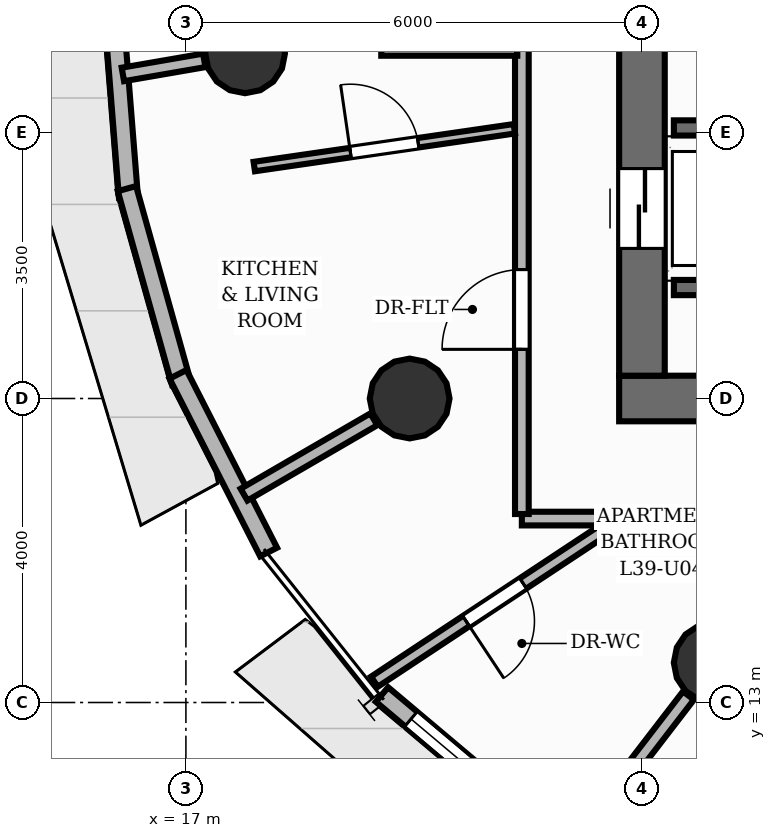
"""IFC4 building model, lengths in metres.
Left out: names, types, materials, properties, quantities, classifications, styles, units other than length and angle.
Written with IfcOpenShell. Run it as: python <this file> out.ifc"""

import sys

from ifc_helpers import new_model, si_unit, direction, frame, frame_2d, origin, origin_2d, place, context, subcontext, project, spatial, rectangle, circle, extrude, element, fill, save


model = new_model("IFC4")
c1 = context("Model", 3, precision=1e-05, world=origin(), true_north=direction((0.0, 1.0)))
c2 = subcontext(c1, "Body", "Model", "MODEL_VIEW")
j1 = project(units=[si_unit("LENGTHUNIT", "METRE"), si_unit("PLANEANGLEUNIT", "RADIAN")], contexts=[c1])
p1 = place(None, origin())
s1 = spatial("IfcSite", under=j1, at=p1, CompositionType="ELEMENT")
p2 = place(p1, origin())
s2 = spatial("IfcBuilding", under=s1, at=p2, CompositionType="ELEMENT")
p3 = place(p2, frame((0.0, 0.0, 132.96)))
s3 = spatial("IfcBuildingStorey", under=s2, at=p3, CompositionType="ELEMENT", Elevation=132.96)
p4 = place(p3, frame((22.7, 17.0, 0.0), z_axis=(0.0, 0.0, 1.0), x_axis=(1.0, 0.0, 0.0)))
e1 = element("IfcWall", 1, at=p4, inside=s3, PredefinedType="SHEAR", context=c2, shape_type="SweptSolid", body=[
    extrude(rectangle(XDim=15.1, YDim=0.6, at=frame_2d((7.55, 0.0))), origin(), (0.0, 0.0, 1.0), 3.2),
])
p5 = place(p4, frame((5.8, 0.0, 0.0)))
e2 = element("IfcOpeningElement", 2, at=p5, cuts=e1, PredefinedType="OPENING", context=c2, shape_type="SweptSolid", body=[
    extrude(rectangle(XDim=1.1, YDim=2.15, at=frame_2d((0.55, 1.075))), frame((0.0, 0.31, 0.0), z_axis=(0.0, -1.0, 0.0), x_axis=(1.0, 0.0, 0.0)), (0.0, 0.0, 1.0), 0.62),
])
p6 = place(p4, frame((9.35, 0.0, 0.0)))
e3 = element("IfcOpeningElement", 3, at=p6, cuts=e1, PredefinedType="OPENING", context=c2, shape_type="SweptSolid", body=[
    extrude(rectangle(XDim=0.9, YDim=2.1, at=frame_2d((0.45, 1.05))), frame((0.0, 0.31, 0.0), z_axis=(0.0, -1.0, 0.0), x_axis=(1.0, 0.0, 0.0)), (0.0, 0.0, 1.0), 0.62),
])
p7 = place(p3, frame((23.0, 17.3, 0.0), z_axis=(0.0, 0.0, 1.0), x_axis=(0.0, 1.0, 0.0)))
e4 = element("IfcWall", 4, at=p7, inside=s3, PredefinedType="SHEAR", context=c2, shape_type="SweptSolid", body=[
    extrude(rectangle(XDim=13.4, YDim=0.6, at=frame_2d((6.7, 0.0))), origin(), (0.0, 0.0, 1.0), 3.2),
])
p8 = place(p7, frame((1.675, 0.0, 0.0)))
e5 = element("IfcOpeningElement", 5, at=p8, cuts=e4, PredefinedType="OPENING", context=c2, shape_type="SweptSolid", body=[
    extrude(rectangle(XDim=1.05, YDim=2.15, at=frame_2d((0.525, 1.075))), frame((0.0, 0.31, 0.0), z_axis=(0.0, -1.0, 0.0), x_axis=(1.0, 0.0, 0.0)), (0.0, 0.0, 1.0), 0.62),
])
p9 = place(p7, frame((6.175, 0.0, 0.0)))
e6 = element("IfcOpeningElement", 6, at=p9, cuts=e4, PredefinedType="OPENING", context=c2, shape_type="SweptSolid", body=[
    extrude(rectangle(XDim=1.05, YDim=2.15, at=frame_2d((0.525, 1.075))), frame((0.0, 0.31, 0.0), z_axis=(0.0, -1.0, 0.0), x_axis=(1.0, 0.0, 0.0)), (0.0, 0.0, 1.0), 0.62),
])
p10 = place(p7, frame((10.675, 0.0, 0.0)))
e7 = element("IfcOpeningElement", 7, at=p10, cuts=e4, PredefinedType="OPENING", context=c2, shape_type="SweptSolid", body=[
    extrude(rectangle(XDim=1.05, YDim=2.15, at=frame_2d((0.525, 1.075))), frame((0.0, 0.31, 0.0), z_axis=(0.0, -1.0, 0.0), x_axis=(1.0, 0.0, 0.0)), (0.0, 0.0, 1.0), 0.62),
])
for number, where, z_axis, x_axis in (
    (8, (17.779, 21.542, 0.0), (0.0, 0.0, 1.0), (1.0, 0.0, 0.0)),
    (9, (19.944, 17.0, 0.0), (0.0, 0.0, 1.0), (1.0, 0.0, 0.0)),
    (10, (23.944, 13.523, 0.0), (0.0, 0.0, 1.0), (1.0, 0.0, 0.0)),
):
    element("IfcColumn", number, at=place(p3, frame(where, z_axis=z_axis, x_axis=x_axis)), inside=s3, PredefinedType="COLUMN", context=c2, shape_type="SweptSolid", body=[
        extrude(circle(Radius=0.525, at=origin_2d()), origin(), (0.0, 0.0, 1.0), 3.2),
    ])
p11 = place(p3, frame((16.244, 19.65, 0.0), z_axis=(0.0, 0.0, 1.0), x_axis=(-0.079420906371, 0.996841170714, 0.0)))
e11 = element("IfcWall", 11, at=p11, inside=s3, PredefinedType="SOLIDWALL", context=c2, shape_type="SweptSolid", body=[
    extrude(rectangle(XDim=2.693, YDim=0.25, at=frame_2d((1.346, 0.0))), origin(), (0.0, 0.0, 1.0), 2.96),
])
p12 = place(p3, frame((16.938, 17.211, 0.0), z_axis=(0.0, 0.0, 1.0), x_axis=(-0.269469206067, 0.963009006698, 0.0)))
e12 = element("IfcWall", 12, at=p12, inside=s3, PredefinedType="SOLIDWALL", context=c2, shape_type="SweptSolid", body=[
    extrude(rectangle(XDim=2.648, YDim=0.25, at=frame_2d((1.324, 0.0))), origin(), (0.0, 0.0, 1.0), 2.96),
])
p13 = place(p3, frame((18.088, 14.98, 0.0), z_axis=(0.0, 0.0, 1.0), x_axis=(-0.454196134835, 0.890901717981, 0.0)))
e13 = element("IfcWall", 13, at=p13, inside=s3, PredefinedType="SOLIDWALL", context=c2, shape_type="SweptSolid", body=[
    extrude(rectangle(XDim=2.624, YDim=0.25, at=frame_2d((1.312, 0.0))), origin(), (0.0, 0.0, 1.0), 2.96),
])
p14 = place(p3, frame((21.605, 11.399, 0.0), z_axis=(0.0, 0.0, 1.0), x_axis=(-0.764825125467, 0.644237943197, 0.0)))
e14 = element("IfcWall", 14, at=p14, inside=s3, PredefinedType="SOLIDWALL", context=c2, shape_type="SweptSolid", body=[
    extrude(rectangle(XDim=2.648, YDim=0.25, at=frame_2d((1.324, 0.0))), origin(), (0.0, 0.0, 1.0), 2.96),
])
p15 = place(p14, frame((0.499, 0.0, 0.85)))
e15 = element("IfcOpeningElement", 15, at=p15, cuts=e14, PredefinedType="OPENING", context=c2, shape_type="SweptSolid", body=[
    extrude(rectangle(XDim=1.65, YDim=1.55, at=frame_2d((0.825, 0.775))), frame((0.0, 0.135, 0.0), z_axis=(0.0, -1.0, 0.0), x_axis=(1.0, 0.0, 0.0)), (0.0, 0.0, 1.0), 0.27),
])
for number, where, z_axis, x_axis in (
    (16, (23.42, 18.46, 0.0), (0.0, 0.0, 1.0), (1.0, 0.0, 0.0)),
    (17, (23.42, 20.56, 0.0), (0.0, 0.0, 1.0), (1.0, 0.0, 0.0)),
):
    element("IfcWall", number, at=place(p3, frame(where, z_axis=z_axis, x_axis=x_axis)), inside=s3, PredefinedType="SHEAR", context=c2, shape_type="SweptSolid", body=[
        extrude(rectangle(XDim=1.71, YDim=0.2, at=frame_2d((0.855, 0.0))), origin(), (0.0, 0.0, 1.0), 3.2),
    ])
p16 = place(p3, frame((17.242, 21.449, 0.0), z_axis=(0.0, 0.0, 1.0), x_axis=(-0.985361391556, -0.170478526599, 0.0)))
e18 = element("IfcWall", 18, at=p16, inside=s3, PredefinedType="PARTITIONING", context=c2, shape_type="SweptSolid", body=[
    extrude(rectangle(XDim=1.087, YDim=0.18, at=frame_2d((0.543, 0.0))), origin(), (0.0, 0.0, 1.0), 2.336),
])
p17 = place(p3, frame((19.472, 16.726, 0.0), z_axis=(0.0, 0.0, 1.0), x_axis=(-0.864844369658, -0.502040054448, 0.0)))
e19 = element("IfcWall", 19, at=p17, inside=s3, PredefinedType="PARTITIONING", context=c2, shape_type="SweptSolid", body=[
    extrude(rectangle(XDim=1.974, YDim=0.18, at=frame_2d((0.987, 0.0))), origin(), (0.0, 0.0, 1.0), 2.336),
])
p18 = place(p3, frame((23.612, 13.092, 0.0), z_axis=(0.0, 0.0, 1.0), x_axis=(-0.609549509747, -0.79274800231, 0.0)))
e20 = element("IfcWall", 20, at=p18, inside=s3, PredefinedType="PARTITIONING", context=c2, shape_type="SweptSolid", body=[
    extrude(rectangle(XDim=2.415, YDim=0.18, at=frame_2d((1.208, 0.0))), origin(), (0.0, 0.0, 1.0), 2.336),
])
p19 = place(p3, frame((39.08, 15.42, 0.0), z_axis=(0.0, 0.0, 1.0), x_axis=(-1.0, 0.0, 0.0)))
e21 = element("IfcWall", 21, at=p19, inside=s3, PredefinedType="PARTITIONING", context=c2, shape_type="SweptSolid", body=[
    extrude(rectangle(XDim=16.39, YDim=0.18, at=frame_2d((8.195, 0.0))), origin(), (0.0, 0.0, 1.0), 2.955),
])
p20 = place(p19, frame((4.593, 0.0, 0.0)))
e22 = element("IfcOpeningElement", 22, at=p20, cuts=e21, PredefinedType="OPENING", context=c2, shape_type="SweptSolid", body=[
    extrude(rectangle(XDim=1.05, YDim=2.15, at=frame_2d((0.525, 1.075))), frame((0.0, 0.1, 0.0), z_axis=(0.0, -1.0, 0.0), x_axis=(1.0, 0.0, 0.0)), (0.0, 0.0, 1.0), 0.2),
])
p21 = place(p3, frame((22.746, 15.42, 0.0), z_axis=(0.0, 0.0, 1.0), x_axis=(-1.0, 0.0, 0.0)))
e23 = element("IfcWall", 23, at=p21, inside=s3, PredefinedType="PARTITIONING", context=c2, shape_type="SweptSolid", body=[
    extrude(rectangle(XDim=1.326, YDim=0.18, at=frame_2d((0.663, 0.0))), origin(), (0.0, 0.0, 1.0), 2.955),
])
p22 = place(p3, frame((21.42, 15.48, 0.0), z_axis=(0.0, 0.0, 1.0), x_axis=(0.0, 1.0, 0.0)))
e24 = element("IfcWall", 24, at=p22, inside=s3, PredefinedType="PARTITIONING", context=c2, shape_type="SweptSolid", body=[
    extrude(rectangle(XDim=6.12, YDim=0.18, at=frame_2d((3.06, 0.0))), origin(), (0.0, 0.0, 1.0), 2.955),
])
p23 = place(p22, frame((2.167, 0.0, 0.0)))
e25 = element("IfcOpeningElement", 25, at=p23, cuts=e24, PredefinedType="OPENING", context=c2, shape_type="SweptSolid", body=[
    extrude(rectangle(XDim=1.05, YDim=2.15, at=frame_2d((0.525, 1.075))), frame((0.0, 0.1, 0.0), z_axis=(0.0, -1.0, 0.0), x_axis=(1.0, 0.0, 0.0)), (0.0, 0.0, 1.0), 0.2),
])
p24 = place(p3, frame((21.36, 21.6, 0.0), z_axis=(0.0, 0.0, 1.0), x_axis=(-1.0, 0.0, 0.0)))
e26 = element("IfcWall", 26, at=p24, inside=s3, PredefinedType="PARTITIONING", context=c2, shape_type="SweptSolid", body=[
    extrude(rectangle(XDim=1.79, YDim=0.18, at=frame_2d((0.895, 0.0))), origin(), (0.0, 0.0, 1.0), 2.336),
])
p25 = place(p3, frame((22.643, 15.365, 0.0), z_axis=(0.0, 0.0, 1.0), x_axis=(-0.83413433024, -0.551561346647, 0.0)))
e27 = element("IfcWall", 27, at=p25, inside=s3, PredefinedType="PLUMBINGWALL", context=c2, shape_type="SweptSolid", body=[
    extrude(rectangle(XDim=3.792, YDim=0.16, at=frame_2d((1.896, 0.0))), origin(), (0.0, 0.0, 1.0), 2.955),
])
p26 = place(p25, frame((1.446, 0.0, 0.0)))
e28 = element("IfcOpeningElement", 28, at=p26, cuts=e27, PredefinedType="OPENING", context=c2, shape_type="SweptSolid", body=[
    extrude(rectangle(XDim=0.9, YDim=2.1, at=frame_2d((0.45, 1.05))), frame((0.0, 0.09, 0.0), z_axis=(0.0, -1.0, 0.0), x_axis=(1.0, 0.0, 0.0)), (0.0, 0.0, 1.0), 0.18),
])
p27 = place(p3, frame((17.899, 20.052, 0.0), z_axis=(0.0, 0.0, 1.0), x_axis=(0.989601977359, 0.143832980941, 0.0)))
e29 = element("IfcWall", 29, at=p27, inside=s3, PredefinedType="PARTITIONING", context=c2, shape_type="SweptSolid", body=[
    extrude(rectangle(XDim=3.458, YDim=0.125, at=frame_2d((1.729, 0.0))), origin(), (0.0, 0.0, 1.0), 2.692),
])
p28 = place(p27, frame((1.279, 0.0, 0.0)))
e30 = element("IfcOpeningElement", 30, at=p28, cuts=e29, PredefinedType="OPENING", context=c2, shape_type="SweptSolid", body=[
    extrude(rectangle(XDim=0.9, YDim=2.1, at=frame_2d((0.45, 1.05))), frame((0.0, 0.073, 0.0), z_axis=(0.0, -1.0, 0.0), x_axis=(1.0, 0.0, 0.0)), (0.0, 0.0, 1.0), 0.145),
])
p29 = place(p15, origin())
e31 = element("IfcWindow", 31, at=p29, inside=s3, PartitioningType="SINGLE_PANEL", PredefinedType="WINDOW", context=c2, shape_type="SweptSolid", body=[
    extrude(rectangle(XDim=1.65, YDim=1.55, at=frame_2d((0.825, 0.775))), frame((0.0, 0.03, 0.0), z_axis=(0.0, -1.0, 0.0), x_axis=(1.0, 0.0, 0.0)), (0.0, 0.0, 1.0), 0.06),
])
fill(e15, e31)
p30 = place(p8, origin())
e32 = element("IfcDoor", 32, at=p30, inside=s3, OperationType="DOUBLE_DOOR_SLIDING", PredefinedType="DOOR", context=c2, shape_type="SweptSolid", body=[
    extrude(rectangle(XDim=1.05, YDim=2.15, at=frame_2d((0.525, 1.075))), frame((0.0, 0.025, 0.0), z_axis=(0.0, -1.0, 0.0), x_axis=(1.0, 0.0, 0.0)), (0.0, 0.0, 1.0), 0.05),
])
fill(e5, e32)
p31 = place(p23, origin())
e33 = element("IfcDoor", 33, at=p31, inside=s3, OperationType="SINGLE_SWING_LEFT", PredefinedType="DOOR", context=c2, shape_type="SweptSolid", body=[
    extrude(rectangle(XDim=1.05, YDim=2.15, at=frame_2d((0.525, 1.075))), frame((0.0, 0.025, 0.0), z_axis=(0.0, -1.0, 0.0), x_axis=(1.0, 0.0, 0.0)), (0.0, 0.0, 1.0), 0.05),
])
fill(e25, e33)
p32 = place(p26, origin())
e34 = element("IfcDoor", 34, at=p32, inside=s3, OperationType="SINGLE_SWING_RIGHT", PredefinedType="DOOR", context=c2, shape_type="SweptSolid", body=[
    extrude(rectangle(XDim=0.9, YDim=2.1, at=frame_2d((0.45, 1.05))), frame((0.0, 0.025, 0.0), z_axis=(0.0, -1.0, 0.0), x_axis=(1.0, 0.0, 0.0)), (0.0, 0.0, 1.0), 0.05),
])
fill(e28, e34)
p33 = place(p28, origin())
e35 = element("IfcDoor", 35, at=p33, inside=s3, OperationType="SINGLE_SWING_LEFT", PredefinedType="DOOR", context=c2, shape_type="SweptSolid", body=[
    extrude(rectangle(XDim=0.9, YDim=2.1, at=frame_2d((0.45, 1.05))), frame((0.0, 0.025, 0.0), z_axis=(0.0, -1.0, 0.0), x_axis=(1.0, 0.0, 0.0)), (0.0, 0.0, 1.0), 0.05),
])
fill(e30, e35)
save(model, sys.argv[1])
